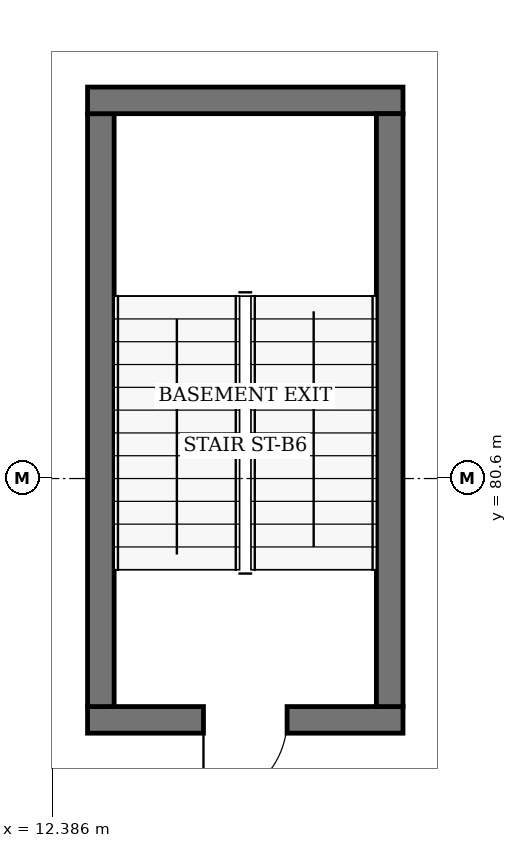
"""IFC4 building model, lengths in metres.
Left out: names, types, materials, properties, quantities, classifications, styles, units other than length and angle.
Written with IfcOpenShell. Run it as: python <this file> out.ifc"""

import sys

from ifc_helpers import new_model, si_unit, direction, frame, frame_2d, origin, place, context, subcontext, project, spatial, rectangle, extrude, element, fill, save


model = new_model("IFC4")
c1 = context("Model", 3, precision=1e-05, world=origin(), true_north=direction((0.0, 1.0)))
c2 = subcontext(c1, "Body", "Model", "MODEL_VIEW")
j1 = project(units=[si_unit("LENGTHUNIT", "METRE"), si_unit("PLANEANGLEUNIT", "RADIAN")], contexts=[c1])
p1 = place(None, origin())
s1 = spatial("IfcSite", under=j1, at=p1, CompositionType="ELEMENT")
p2 = place(p1, origin())
s2 = spatial("IfcBuilding", under=s1, at=p2, CompositionType="ELEMENT")
p3 = place(p2, frame((0.0, 0.0, -4.8)))
s3 = spatial("IfcBuildingStorey", under=s2, at=p3, CompositionType="ELEMENT", Elevation=-4.8)
p4 = place(p3, frame((17.0, 77.425, 0.0), z_axis=(0.0, 0.0, 1.0), x_axis=(-1.0, 0.0, 0.0)))
e1 = element("IfcWall", 1, at=p4, inside=s3, PredefinedType="SOLIDWALL", context=c2, shape_type="SweptSolid", body=[
    extrude(rectangle(XDim=4.15, YDim=0.35, at=frame_2d((2.075, 0.0))), origin(), (0.0, 0.0, 1.0), 4.56),
])
p5 = place(p4, frame((1.525, 0.0, 0.0)))
e2 = element("IfcOpeningElement", 2, at=p5, cuts=e1, PredefinedType="OPENING", context=c2, shape_type="SweptSolid", body=[
    extrude(rectangle(XDim=1.1, YDim=2.15, at=frame_2d((0.55, 1.075))), frame((0.0, 0.195, 0.0), z_axis=(0.0, -1.0, 0.0), x_axis=(1.0, 0.0, 0.0)), (0.0, 0.0, 1.0), 0.39),
])
p6 = place(p3, frame((13.025, 77.6, 0.0), z_axis=(0.0, 0.0, 1.0), x_axis=(0.0, 1.0, 0.0)))
e3 = element("IfcWall", 3, at=p6, inside=s3, PredefinedType="SOLIDWALL", context=c2, shape_type="SweptSolid", body=[
    extrude(rectangle(XDim=7.8, YDim=0.35, at=frame_2d((3.9, 0.0))), origin(), (0.0, 0.0, 1.0), 4.56),
])
p7 = place(p3, frame((12.85, 85.575, 0.0), z_axis=(0.0, 0.0, 1.0), x_axis=(1.0, 0.0, 0.0)))
e4 = element("IfcWall", 4, at=p7, inside=s3, PredefinedType="SOLIDWALL", context=c2, shape_type="SweptSolid", body=[
    extrude(rectangle(XDim=4.15, YDim=0.35, at=frame_2d((2.075, 0.0))), origin(), (0.0, 0.0, 1.0), 4.56),
])
p8 = place(p3, frame((16.825, 85.4, 0.0), z_axis=(0.0, 0.0, 1.0), x_axis=(0.0, -1.0, 0.0)))
e5 = element("IfcWall", 5, at=p8, inside=s3, PredefinedType="SOLIDWALL", context=c2, shape_type="SweptSolid", body=[
    extrude(rectangle(XDim=7.8, YDim=0.35, at=frame_2d((3.9, 0.0))), origin(), (0.0, 0.0, 1.0), 4.56),
])
p9 = place(p5, origin())
e6 = element("IfcDoor", 6, at=p9, inside=s3, OperationType="SINGLE_SWING_RIGHT", PredefinedType="DOOR", context=c2, shape_type="SweptSolid", body=[
    extrude(rectangle(XDim=1.1, YDim=2.15, at=frame_2d((0.55, 1.075))), frame((0.0, 0.025, 0.0), z_axis=(0.0, -1.0, 0.0), x_axis=(1.0, 0.0, 0.0)), (0.0, 0.0, 1.0), 0.05),
])
fill(e2, e6)
save(model, sys.argv[1])
